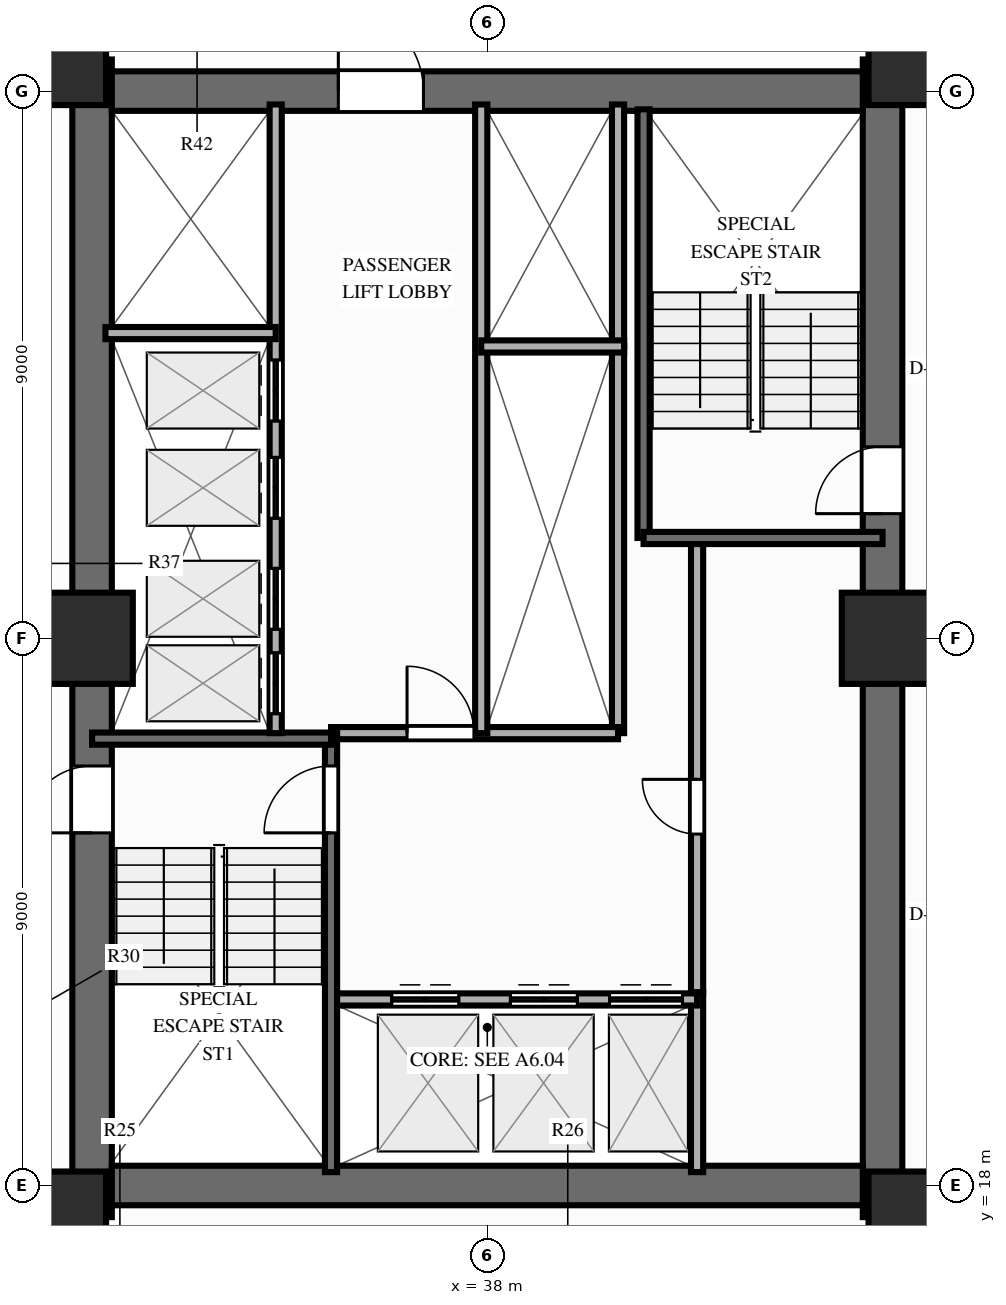
"""IFC4 building model, lengths in metres.
Left out: names, types, materials, properties, quantities, classifications, styles, units other than length and angle.
Written with IfcOpenShell. Run it as: python <this file> out.ifc"""

import sys

from ifc_helpers import new_model, si_unit, direction, frame, frame_2d, origin, origin_2d, place, context, subcontext, project, spatial, rectangle, extrude, source, transform, mapped, element, fill, save


model = new_model("IFC4")
c1 = context("Model", 3, precision=1e-05, world=origin(), true_north=direction((0.0, 1.0)))
c2 = subcontext(c1, "Body", "Model", "MODEL_VIEW")
j1 = project(units=[si_unit("LENGTHUNIT", "METRE"), si_unit("PLANEANGLEUNIT", "RADIAN")], contexts=[c1])
p1 = place(None, origin())
s1 = spatial("IfcSite", under=j1, at=p1, CompositionType="ELEMENT")
p2 = place(p1, origin())
s2 = spatial("IfcBuilding", under=s1, at=p2, CompositionType="ELEMENT")
p3 = place(p2, frame((0.0, 0.0, 22.4)))
s3 = spatial("IfcBuildingStorey", under=s2, at=p3, CompositionType="ELEMENT", Elevation=22.4)
p4 = place(p3, frame((31.5, 17.48, 0.0), z_axis=(0.0, 0.0, 1.0), x_axis=(0.0, 1.0, 0.0)))
e1 = element("IfcWall", 1, at=p4, inside=s3, PredefinedType="SHEAR", context=c2, shape_type="SweptSolid", body=[
    extrude(rectangle(XDim=19.04, YDim=0.65, at=frame_2d((9.52, 0.0))), origin(), (0.0, 0.0, 1.0), 3.0),
])
p5 = place(p4, frame((6.32, 0.0, 0.0)))
e2 = element("IfcOpeningElement", 2, at=p5, cuts=e1, PredefinedType="OPENING", context=c2, shape_type="SweptSolid", body=[
    extrude(rectangle(XDim=1.1, YDim=2.15, at=frame_2d((0.55, 1.075))), frame((0.0, 0.337, 0.0), z_axis=(0.0, -1.0, 0.0), x_axis=(1.0, 0.0, 0.0)), (0.0, 0.0, 1.0), 0.674),
])
p6 = place(p3, frame((44.5, 17.48, 0.0), z_axis=(0.0, 0.0, 1.0), x_axis=(0.0, 1.0, 0.0)))
e3 = element("IfcWall", 3, at=p6, inside=s3, PredefinedType="SHEAR", context=c2, shape_type="SweptSolid", body=[
    extrude(rectangle(XDim=19.04, YDim=0.65, at=frame_2d((9.52, 0.0))), origin(), (0.0, 0.0, 1.0), 3.0),
])
p7 = place(p6, frame((12.67, 0.0, 0.0), z_axis=(0.0, 0.0, 1.0), x_axis=(-1.0, 0.0, 0.0)))
e4 = element("IfcOpeningElement", 4, at=p7, cuts=e3, PredefinedType="OPENING", context=c2, shape_type="SweptSolid", body=[
    extrude(rectangle(XDim=1.1, YDim=2.15, at=frame_2d((0.55, 1.075))), frame((0.0, 0.337, 0.0), z_axis=(0.0, -1.0, 0.0), x_axis=(1.0, 0.0, 0.0)), (0.0, 0.0, 1.0), 0.674),
])
p8 = place(p3, frame((31.825, 18.0, 0.0), z_axis=(0.0, 0.0, 1.0), x_axis=(1.0, 0.0, 0.0)))
e5 = element("IfcWall", 5, at=p8, inside=s3, PredefinedType="SHEAR", context=c2, shape_type="SweptSolid", body=[
    extrude(rectangle(XDim=12.35, YDim=0.65, at=frame_2d((6.175, 0.0))), origin(), (0.0, 0.0, 1.0), 3.0),
])
p9 = place(p3, frame((31.825, 36.0, 0.0), z_axis=(0.0, 0.0, 1.0), x_axis=(1.0, 0.0, 0.0)))
e6 = element("IfcWall", 6, at=p9, inside=s3, PredefinedType="SHEAR", context=c2, shape_type="SweptSolid", body=[
    extrude(rectangle(XDim=12.35, YDim=0.65, at=frame_2d((6.175, 0.0))), origin(), (0.0, 0.0, 1.0), 3.0),
])
p10 = place(p9, frame((5.125, 0.0, 0.0), z_axis=(0.0, 0.0, 1.0), x_axis=(-1.0, 0.0, 0.0)))
e7 = element("IfcOpeningElement", 7, at=p10, cuts=e6, PredefinedType="OPENING", context=c2, shape_type="SweptSolid", body=[
    extrude(rectangle(XDim=1.4, YDim=2.15, at=frame_2d((0.7, 1.075))), frame((0.0, 0.337, 0.0), z_axis=(0.0, -1.0, 0.0), x_axis=(1.0, 0.0, 0.0)), (0.0, 0.0, 1.0), 0.674),
])
m1 = source(origin(), c2, "Body", "SweptSolid", [
    extrude(rectangle(XDim=1.5, YDim=1.5, at=origin_2d()), origin(), (0.0, 0.0, 1.0), 3.0),
])
for number, where, z_axis, x_axis in (
    (8, (30.98, 17.48, 0.0), (0.0, 0.0, 1.0), (1.0, 0.0, 0.0)),
    (9, (45.02, 17.48, 0.0), (0.0, 0.0, 1.0), (1.0, 0.0, 0.0)),
    (10, (30.98, 36.52, 0.0), (0.0, 0.0, 1.0), (1.0, 0.0, 0.0)),
    (11, (45.02, 36.52, 0.0), (0.0, 0.0, 1.0), (1.0, 0.0, 0.0)),
    (12, (31.42, 27.0, 0.0), (0.0, 0.0, 1.0), (1.0, 0.0, 0.0)),
    (13, (44.58, 27.0, 0.0), (0.0, 0.0, 1.0), (1.0, 0.0, 0.0)),
):
    element("IfcColumn", number, at=place(p3, frame(where, z_axis=z_axis, x_axis=x_axis)), inside=s3, PredefinedType="COLUMN", context=c2, shape_type="MappedRepresentation", body=[
        mapped(m1, transform((0.0, 0.0, 0.0), scale=1.0)),
    ])
p11 = place(p3, frame((41.45, 18.22, 0.0), z_axis=(0.0, 0.0, 1.0), x_axis=(0.0, 1.0, 0.0)))
e14 = element("IfcWall", 14, at=p11, inside=s3, PredefinedType="PARTITIONING", context=c2, shape_type="SweptSolid", body=[
    extrude(rectangle(XDim=2.96, YDim=0.2, at=frame_2d((1.48, 0.0))), origin(), (0.0, 0.0, 1.0), 2.79),
])
p12 = place(p3, frame((41.45, 21.18, 0.0), z_axis=(0.0, 0.0, 1.0), x_axis=(0.0, 1.0, 0.0)))
e15 = element("IfcWall", 15, at=p12, inside=s3, PredefinedType="PARTITIONING", context=c2, shape_type="SweptSolid", body=[
    extrude(rectangle(XDim=7.42, YDim=0.2, at=frame_2d((3.71, 0.0))), origin(), (0.0, 0.0, 1.0), 2.79),
])
p13 = place(p12, frame((2.6, 0.0, 0.0)))
e16 = element("IfcOpeningElement", 16, at=p13, cuts=e15, PredefinedType="OPENING", context=c2, shape_type="SweptSolid", body=[
    extrude(rectangle(XDim=0.9, YDim=2.1, at=frame_2d((0.45, 1.05))), frame((0.0, 0.112, 0.0), z_axis=(0.0, -1.0, 0.0), x_axis=(1.0, 0.0, 0.0)), (0.0, 0.0, 1.0), 0.224),
])
p14 = place(p3, frame((40.15, 25.44, 0.0), z_axis=(0.0, 0.0, 1.0), x_axis=(0.0, 1.0, 0.0)))
e17 = element("IfcWall", 17, at=p14, inside=s3, PredefinedType="PARTITIONING", context=c2, shape_type="SweptSolid", body=[
    extrude(rectangle(XDim=6.36, YDim=0.2, at=frame_2d((3.18, 0.0))), origin(), (0.0, 0.0, 1.0), 2.79),
])
p15 = place(p3, frame((40.15, 31.8, 0.0), z_axis=(0.0, 0.0, 1.0), x_axis=(0.0, 1.0, 0.0)))
e18 = element("IfcWall", 18, at=p15, inside=s3, PredefinedType="PARTITIONING", context=c2, shape_type="SweptSolid", body=[
    extrude(rectangle(XDim=3.98, YDim=0.2, at=frame_2d((1.99, 0.0))), origin(), (0.0, 0.0, 1.0), 2.79),
])
p16 = place(p3, frame((35.43, 21.06, 0.0), z_axis=(0.0, 0.0, 1.0), x_axis=(1.0, 0.0, 0.0)))
e19 = element("IfcWall", 19, at=p16, inside=s3, PredefinedType="PARTITIONING", context=c2, shape_type="SweptSolid", body=[
    extrude(rectangle(XDim=6.02, YDim=0.2, at=frame_2d((3.01, 0.0))), origin(), (0.0, 0.0, 1.0), 2.79),
])
p17 = place(p16, frame((1.0, 0.0, 0.0)))
e20 = element("IfcOpeningElement", 20, at=p17, cuts=e19, PredefinedType="OPENING", context=c2, shape_type="SweptSolid", body=[
    extrude(rectangle(XDim=1.1, YDim=2.15, at=frame_2d((0.55, 1.075))), frame((0.0, 0.112, 0.0), z_axis=(0.0, -1.0, 0.0), x_axis=(1.0, 0.0, 0.0)), (0.0, 0.0, 1.0), 0.224),
])
p18 = place(p16, frame((2.95, 0.0, 0.0)))
e21 = element("IfcOpeningElement", 21, at=p18, cuts=e19, PredefinedType="OPENING", context=c2, shape_type="SweptSolid", body=[
    extrude(rectangle(XDim=1.1, YDim=2.15, at=frame_2d((0.55, 1.075))), frame((0.0, 0.112, 0.0), z_axis=(0.0, -1.0, 0.0), x_axis=(1.0, 0.0, 0.0)), (0.0, 0.0, 1.0), 0.224),
])
p19 = place(p16, frame((4.58, 0.0, 0.0)))
e22 = element("IfcOpeningElement", 22, at=p19, cuts=e19, PredefinedType="OPENING", context=c2, shape_type="SweptSolid", body=[
    extrude(rectangle(XDim=1.2, YDim=2.15, at=frame_2d((0.6, 1.075))), frame((0.0, 0.112, 0.0), z_axis=(0.0, -1.0, 0.0), x_axis=(1.0, 0.0, 0.0)), (0.0, 0.0, 1.0), 0.224),
])
p20 = place(p3, frame((35.43, 25.44, 0.0), z_axis=(0.0, 0.0, 1.0), x_axis=(1.0, 0.0, 0.0)))
e23 = element("IfcWall", 23, at=p20, inside=s3, PredefinedType="PARTITIONING", context=c2, shape_type="SweptSolid", body=[
    extrude(rectangle(XDim=4.72, YDim=0.2, at=frame_2d((2.36, 0.0))), origin(), (0.0, 0.0, 1.0), 2.79),
])
p21 = place(p20, frame((1.25, 0.0, 0.0)))
e24 = element("IfcOpeningElement", 24, at=p21, cuts=e23, PredefinedType="OPENING", context=c2, shape_type="SweptSolid", body=[
    extrude(rectangle(XDim=1.1, YDim=2.15, at=frame_2d((0.55, 1.075))), frame((0.0, 0.112, 0.0), z_axis=(0.0, -1.0, 0.0), x_axis=(1.0, 0.0, 0.0)), (0.0, 0.0, 1.0), 0.224),
])
p22 = place(p3, frame((35.43, 18.22, 0.0), z_axis=(0.0, 0.0, 1.0), x_axis=(0.0, 1.0, 0.0)))
e25 = element("IfcWall", 25, at=p22, inside=s3, PredefinedType="SOLIDWALL", context=c2, shape_type="SweptSolid", body=[
    extrude(rectangle(XDim=7.22, YDim=0.2, at=frame_2d((3.61, 0.0))), origin(), (0.0, 0.0, 1.0), 2.79),
])
p23 = place(p22, frame((6.68, 0.0, 0.0), z_axis=(0.0, 0.0, 1.0), x_axis=(-1.0, 0.0, 0.0)))
e26 = element("IfcOpeningElement", 26, at=p23, cuts=e25, PredefinedType="OPENING", context=c2, shape_type="SweptSolid", body=[
    extrude(rectangle(XDim=1.1, YDim=2.15, at=frame_2d((0.55, 1.075))), frame((0.0, 0.112, 0.0), z_axis=(0.0, -1.0, 0.0), x_axis=(1.0, 0.0, 0.0)), (0.0, 0.0, 1.0), 0.224),
])
p24 = place(p3, frame((31.5, 25.35, 0.0), z_axis=(0.0, 0.0, 1.0), x_axis=(1.0, 0.0, 0.0)))
e27 = element("IfcWall", 27, at=p24, inside=s3, PredefinedType="SOLIDWALL", context=c2, shape_type="SweptSolid", body=[
    extrude(rectangle(XDim=3.93, YDim=0.2, at=frame_2d((1.965, 0.0))), origin(), (0.0, 0.0, 1.0), 2.79),
])
p25 = place(p3, frame((40.57, 28.65, 0.0), z_axis=(0.0, 0.0, 1.0), x_axis=(0.0, 1.0, 0.0)))
e28 = element("IfcWall", 28, at=p25, inside=s3, PredefinedType="SOLIDWALL", context=c2, shape_type="SweptSolid", body=[
    extrude(rectangle(XDim=7.05, YDim=0.2, at=frame_2d((3.525, 0.0))), origin(), (0.0, 0.0, 1.0), 2.79),
])
p26 = place(p3, frame((40.57, 28.65, 0.0), z_axis=(0.0, 0.0, 1.0), x_axis=(1.0, 0.0, 0.0)))
e29 = element("IfcWall", 29, at=p26, inside=s3, PredefinedType="SOLIDWALL", context=c2, shape_type="SweptSolid", body=[
    extrude(rectangle(XDim=3.93, YDim=0.2, at=frame_2d((1.965, 0.0))), origin(), (0.0, 0.0, 1.0), 2.79),
])
p27 = place(p3, frame((34.52, 25.44, 0.0), z_axis=(0.0, 0.0, 1.0), x_axis=(0.0, 1.0, 0.0)))
e30 = element("IfcWall", 30, at=p27, inside=s3, PredefinedType="PARTITIONING", context=c2, shape_type="SweptSolid", body=[
    extrude(rectangle(XDim=10.34, YDim=0.2, at=frame_2d((5.17, 0.0))), origin(), (0.0, 0.0, 1.0), 2.79),
])
p28 = place(p27, frame((0.32, 0.0, 0.0)))
e31 = element("IfcOpeningElement", 31, at=p28, cuts=e30, PredefinedType="OPENING", context=c2, shape_type="SweptSolid", body=[
    extrude(rectangle(XDim=1.0, YDim=2.15, at=frame_2d((0.5, 1.075))), frame((0.0, 0.112, 0.0), z_axis=(0.0, -1.0, 0.0), x_axis=(1.0, 0.0, 0.0)), (0.0, 0.0, 1.0), 0.224),
])
p29 = place(p27, frame((1.71, 0.0, 0.0)))
e32 = element("IfcOpeningElement", 32, at=p29, cuts=e30, PredefinedType="OPENING", context=c2, shape_type="SweptSolid", body=[
    extrude(rectangle(XDim=1.0, YDim=2.15, at=frame_2d((0.5, 1.075))), frame((0.0, 0.112, 0.0), z_axis=(0.0, -1.0, 0.0), x_axis=(1.0, 0.0, 0.0)), (0.0, 0.0, 1.0), 0.224),
])
p30 = place(p27, frame((3.535, 0.0, 0.0)))
e33 = element("IfcOpeningElement", 33, at=p30, cuts=e30, PredefinedType="OPENING", context=c2, shape_type="SweptSolid", body=[
    extrude(rectangle(XDim=1.0, YDim=2.15, at=frame_2d((0.5, 1.075))), frame((0.0, 0.112, 0.0), z_axis=(0.0, -1.0, 0.0), x_axis=(1.0, 0.0, 0.0)), (0.0, 0.0, 1.0), 0.224),
])
p31 = place(p27, frame((5.135, 0.0, 0.0)))
e34 = element("IfcOpeningElement", 34, at=p31, cuts=e30, PredefinedType="OPENING", context=c2, shape_type="SweptSolid", body=[
    extrude(rectangle(XDim=1.0, YDim=2.15, at=frame_2d((0.5, 1.075))), frame((0.0, 0.112, 0.0), z_axis=(0.0, -1.0, 0.0), x_axis=(1.0, 0.0, 0.0)), (0.0, 0.0, 1.0), 0.224),
])
p32 = place(p3, frame((31.72, 32.02, 0.0), z_axis=(0.0, 0.0, 1.0), x_axis=(1.0, 0.0, 0.0)))
e35 = element("IfcWall", 35, at=p32, inside=s3, PredefinedType="PARTITIONING", context=c2, shape_type="SweptSolid", body=[
    extrude(rectangle(XDim=2.8, YDim=0.2, at=frame_2d((1.4, 0.0))), origin(), (0.0, 0.0, 1.0), 2.79),
])
p33 = place(p3, frame((37.9, 25.44, 0.0), z_axis=(0.0, 0.0, 1.0), x_axis=(0.0, 1.0, 0.0)))
e36 = element("IfcWall", 36, at=p33, inside=s3, PredefinedType="PARTITIONING", context=c2, shape_type="SweptSolid", body=[
    extrude(rectangle(XDim=10.34, YDim=0.2, at=frame_2d((5.17, 0.0))), origin(), (0.0, 0.0, 1.0), 2.79),
])
p34 = place(p3, frame((37.9, 31.8, 0.0), z_axis=(0.0, 0.0, 1.0), x_axis=(1.0, 0.0, 0.0)))
e37 = element("IfcWall", 37, at=p34, inside=s3, PredefinedType="PARTITIONING", context=c2, shape_type="SweptSolid", body=[
    extrude(rectangle(XDim=2.35, YDim=0.2, at=frame_2d((1.175, 0.0))), origin(), (0.0, 0.0, 1.0), 2.79),
])
m2 = source(origin(), c2, "Body", "SweptSolid", [
    extrude(rectangle(XDim=1.1, YDim=2.15, at=frame_2d((0.55, 1.075))), frame((0.0, 0.025, 0.0), z_axis=(0.0, -1.0, 0.0), x_axis=(1.0, 0.0, 0.0)), (0.0, 0.0, 1.0), 0.05),
])
p35 = place(p5, origin())
e38 = element("IfcDoor", 38, at=p35, inside=s3, OperationType="SINGLE_SWING_LEFT", PredefinedType="DOOR", context=c2, shape_type="MappedRepresentation", body=[
    mapped(m2, transform((0.0, 0.0, 0.0), scale=1.0)),
])
fill(e2, e38)
p36 = place(p7, origin())
e39 = element("IfcDoor", 39, at=p36, inside=s3, OperationType="SINGLE_SWING_RIGHT", PredefinedType="DOOR", context=c2, shape_type="MappedRepresentation", body=[
    mapped(m2, transform((0.0, 0.0, 0.0), scale=1.0)),
])
fill(e4, e39)
m3 = source(origin(), c2, "Body", "SweptSolid", [
    extrude(rectangle(XDim=1.4, YDim=2.15, at=frame_2d((0.7, 1.075))), frame((0.0, 0.025, 0.0), z_axis=(0.0, -1.0, 0.0), x_axis=(1.0, 0.0, 0.0)), (0.0, 0.0, 1.0), 0.05),
])
p37 = place(p10, origin())
e40 = element("IfcDoor", 40, at=p37, inside=s3, OperationType="SINGLE_SWING_RIGHT", PredefinedType="DOOR", context=c2, shape_type="MappedRepresentation", body=[
    mapped(m3, transform((0.0, 0.0, 0.0), scale=1.0)),
])
fill(e7, e40)
m4 = source(origin(), c2, "Body", "SweptSolid", [
    extrude(rectangle(XDim=0.9, YDim=2.1, at=frame_2d((0.45, 1.05))), frame((0.0, 0.025, 0.0), z_axis=(0.0, -1.0, 0.0), x_axis=(1.0, 0.0, 0.0)), (0.0, 0.0, 1.0), 0.05),
])
p38 = place(p13, origin())
e41 = element("IfcDoor", 41, at=p38, inside=s3, OperationType="SINGLE_SWING_RIGHT", PredefinedType="DOOR", context=c2, shape_type="MappedRepresentation", body=[
    mapped(m4, transform((0.0, 0.0, 0.0), scale=1.0)),
])
fill(e16, e41)
p39 = place(p17, origin())
e42 = element("IfcDoor", 42, at=p39, inside=s3, OperationType="DOUBLE_DOOR_SLIDING", PredefinedType="DOOR", context=c2, shape_type="MappedRepresentation", body=[
    mapped(m2, transform((0.0, 0.0, 0.0), scale=1.0)),
])
fill(e20, e42)
p40 = place(p18, origin())
e43 = element("IfcDoor", 43, at=p40, inside=s3, OperationType="DOUBLE_DOOR_SLIDING", PredefinedType="DOOR", context=c2, shape_type="MappedRepresentation", body=[
    mapped(m2, transform((0.0, 0.0, 0.0), scale=1.0)),
])
fill(e21, e43)
m5 = source(origin(), c2, "Body", "SweptSolid", [
    extrude(rectangle(XDim=1.2, YDim=2.15, at=frame_2d((0.6, 1.075))), frame((0.0, 0.025, 0.0), z_axis=(0.0, -1.0, 0.0), x_axis=(1.0, 0.0, 0.0)), (0.0, 0.0, 1.0), 0.05),
])
p41 = place(p19, origin())
e44 = element("IfcDoor", 44, at=p41, inside=s3, OperationType="DOUBLE_DOOR_SLIDING", PredefinedType="DOOR", context=c2, shape_type="MappedRepresentation", body=[
    mapped(m5, transform((0.0, 0.0, 0.0), scale=1.0)),
])
fill(e22, e44)
p42 = place(p21, origin())
e45 = element("IfcDoor", 45, at=p42, inside=s3, OperationType="SINGLE_SWING_LEFT", PredefinedType="DOOR", context=c2, shape_type="MappedRepresentation", body=[
    mapped(m2, transform((0.0, 0.0, 0.0), scale=1.0)),
])
fill(e24, e45)
p43 = place(p23, origin())
e46 = element("IfcDoor", 46, at=p43, inside=s3, OperationType="SINGLE_SWING_RIGHT", PredefinedType="DOOR", context=c2, shape_type="MappedRepresentation", body=[
    mapped(m2, transform((0.0, 0.0, 0.0), scale=1.0)),
])
fill(e26, e46)
m6 = source(origin(), c2, "Body", "SweptSolid", [
    extrude(rectangle(XDim=1.0, YDim=2.15, at=frame_2d((0.5, 1.075))), frame((0.0, 0.025, 0.0), z_axis=(0.0, -1.0, 0.0), x_axis=(1.0, 0.0, 0.0)), (0.0, 0.0, 1.0), 0.05),
])
p44 = place(p28, origin())
e47 = element("IfcDoor", 47, at=p44, inside=s3, OperationType="DOUBLE_DOOR_SLIDING", PredefinedType="DOOR", context=c2, shape_type="MappedRepresentation", body=[
    mapped(m6, transform((0.0, 0.0, 0.0), scale=1.0)),
])
fill(e31, e47)
p45 = place(p29, origin())
e48 = element("IfcDoor", 48, at=p45, inside=s3, OperationType="DOUBLE_DOOR_SLIDING", PredefinedType="DOOR", context=c2, shape_type="MappedRepresentation", body=[
    mapped(m6, transform((0.0, 0.0, 0.0), scale=1.0)),
])
fill(e32, e48)
p46 = place(p30, origin())
e49 = element("IfcDoor", 49, at=p46, inside=s3, OperationType="DOUBLE_DOOR_SLIDING", PredefinedType="DOOR", context=c2, shape_type="MappedRepresentation", body=[
    mapped(m6, transform((0.0, 0.0, 0.0), scale=1.0)),
])
fill(e33, e49)
p47 = place(p31, origin())
e50 = element("IfcDoor", 50, at=p47, inside=s3, OperationType="DOUBLE_DOOR_SLIDING", PredefinedType="DOOR", context=c2, shape_type="MappedRepresentation", body=[
    mapped(m6, transform((0.0, 0.0, 0.0), scale=1.0)),
])
fill(e34, e50)
save(model, sys.argv[1])
